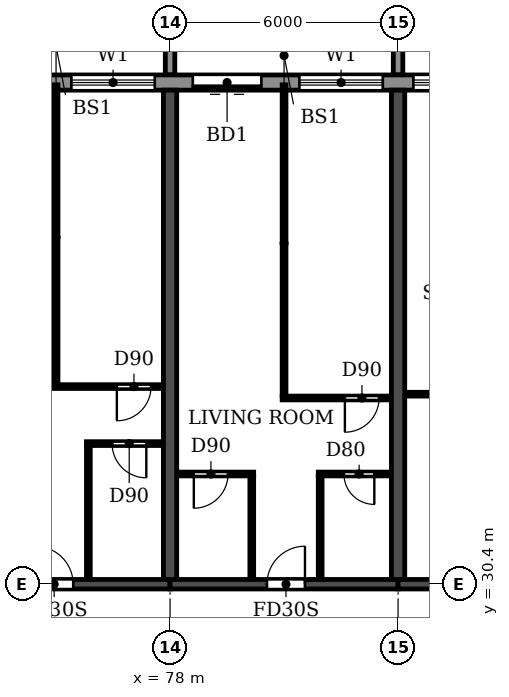
"""IFC4 building model, lengths in metres.
Left out: names, types, materials, properties, quantities, classifications, styles, units other than length and angle.
Written with IfcOpenShell. Run it as: python <this file> out.ifc"""

import sys

from ifc_helpers import new_model, si_unit, direction, frame, frame_2d, origin, place, context, subcontext, project, spatial, polyline, rectangle, outline, extrude, source, transform, mapped, element, fill, save


model = new_model("IFC4")
c1 = context("Model", 3, precision=1e-05, world=origin(), true_north=direction((0.0, 1.0)))
c2 = subcontext(c1, "Body", "Model", "MODEL_VIEW")
j1 = project(units=[si_unit("LENGTHUNIT", "METRE"), si_unit("PLANEANGLEUNIT", "RADIAN")], contexts=[c1])
p1 = place(None, origin())
s1 = spatial("IfcSite", under=j1, at=p1, CompositionType="ELEMENT")
p2 = place(p1, origin())
s2 = spatial("IfcBuilding", under=s1, at=p2, CompositionType="ELEMENT")
p3 = place(p2, frame((0.0, 0.0, 102.6)))
s3 = spatial("IfcBuildingStorey", under=s2, at=p3, CompositionType="ELEMENT", Elevation=102.6)
for number, where, z_axis, x_axis in (
    (1, (78.0, 30.525, 0.0), (0.0, 0.0, 1.0), (0.0, 1.0, 0.0)),
    (2, (84.0, 30.525, 0.0), (0.0, 0.0, 1.0), (0.0, 1.0, 0.0)),
):
    element("IfcWall", number, at=place(p3, frame(where, z_axis=z_axis, x_axis=x_axis)), inside=s3, PredefinedType="SHEAR", context=c2, shape_type="SweptSolid", body=[
        extrude(rectangle(XDim=12.875, YDim=0.35, at=frame_2d((6.438, 0.0))), origin(), (0.0, 0.0, 1.0), 3.0),
    ])
p4 = place(p3, frame((72.0, 30.4, 0.0), z_axis=(0.0, 0.0, 1.0), x_axis=(1.0, 0.0, 0.0)))
e3 = element("IfcWall", 3, at=p4, inside=s3, PredefinedType="SHEAR", context=c2, shape_type="SweptSolid", body=[
    extrude(rectangle(XDim=6.0, YDim=0.25, at=frame_2d((3.0, 0.0))), origin(), (0.0, 0.0, 1.0), 2.4),
])
p5 = place(p4, frame((2.45, 0.0, 0.0)))
e4 = element("IfcOpeningElement", 4, at=p5, cuts=e3, PredefinedType="OPENING", context=c2, shape_type="SweptSolid", body=[
    extrude(rectangle(XDim=1.0, YDim=2.1, at=frame_2d((0.5, 1.05))), frame((0.0, 0.135, 0.0), z_axis=(0.0, -1.0, 0.0), x_axis=(1.0, 0.0, 0.0)), (0.0, 0.0, 1.0), 0.27),
])
p6 = place(p3, frame((78.0, 30.4, 0.0), z_axis=(0.0, 0.0, 1.0), x_axis=(1.0, 0.0, 0.0)))
e5 = element("IfcWall", 5, at=p6, inside=s3, PredefinedType="SHEAR", context=c2, shape_type="SweptSolid", body=[
    extrude(rectangle(XDim=6.0, YDim=0.25, at=frame_2d((3.0, 0.0))), origin(), (0.0, 0.0, 1.0), 2.4),
])
p7 = place(p6, frame((2.55, 0.0, 0.0)))
e6 = element("IfcOpeningElement", 6, at=p7, cuts=e5, PredefinedType="OPENING", context=c2, shape_type="SweptSolid", body=[
    extrude(rectangle(XDim=1.0, YDim=2.1, at=frame_2d((0.5, 1.05))), frame((0.0, 0.135, 0.0), z_axis=(0.0, -1.0, 0.0), x_axis=(1.0, 0.0, 0.0)), (0.0, 0.0, 1.0), 0.27),
])
p8 = place(p3, frame((84.0, 30.4, 0.0), z_axis=(0.0, 0.0, 1.0), x_axis=(1.0, 0.0, 0.0)))
e7 = element("IfcWall", 7, at=p8, inside=s3, PredefinedType="SHEAR", context=c2, shape_type="SweptSolid", body=[
    extrude(rectangle(XDim=6.0, YDim=0.25, at=frame_2d((3.0, 0.0))), origin(), (0.0, 0.0, 1.0), 2.4),
])
p9 = place(p8, frame((2.55, 0.0, 0.0)))
e8 = element("IfcOpeningElement", 8, at=p9, cuts=e7, PredefinedType="OPENING", context=c2, shape_type="SweptSolid", body=[
    extrude(rectangle(XDim=1.0, YDim=2.1, at=frame_2d((0.5, 1.05))), frame((0.0, 0.135, 0.0), z_axis=(0.0, -1.0, 0.0), x_axis=(1.0, 0.0, 0.0)), (0.0, 0.0, 1.0), 0.27),
])
p10 = place(p3, frame((91.317, 43.6, 0.0), z_axis=(0.0, 0.0, 1.0), x_axis=(-1.0, 0.0, 0.0)))
e9 = element("IfcWall", 9, at=p10, inside=s3, PredefinedType="STANDARD", context=c2, shape_type="SweptSolid", body=[
    extrude(rectangle(XDim=80.634, YDim=0.4, at=frame_2d((40.317, 0.0))), origin(), (0.0, 0.0, 1.0), 3.0),
])
p11 = place(p10, frame((76.717, 0.0, 0.9)))
e10 = element("IfcOpeningElement", 10, at=p11, cuts=e9, PredefinedType="OPENING", context=c2, shape_type="SweptSolid", body=[
    extrude(rectangle(XDim=2.2, YDim=1.5, at=frame_2d((1.1, 0.75))), frame((0.0, 0.21, 0.0), z_axis=(0.0, -1.0, 0.0), x_axis=(1.0, 0.0, 0.0)), (0.0, 0.0, 1.0), 0.42),
])
p12 = place(p10, frame((73.917, 0.0, 0.0)))
e11 = element("IfcOpeningElement", 11, at=p12, cuts=e9, PredefinedType="OPENING", context=c2, shape_type="SweptSolid", body=[
    extrude(rectangle(XDim=1.8, YDim=2.4, at=frame_2d((0.9, 1.2))), frame((0.0, 0.21, 0.0), z_axis=(0.0, -1.0, 0.0), x_axis=(1.0, 0.0, 0.0)), (0.0, 0.0, 1.0), 0.42),
])
p13 = place(p10, frame((70.717, 0.0, 0.9)))
e12 = element("IfcOpeningElement", 12, at=p13, cuts=e9, PredefinedType="OPENING", context=c2, shape_type="SweptSolid", body=[
    extrude(rectangle(XDim=2.2, YDim=1.5, at=frame_2d((1.1, 0.75))), frame((0.0, 0.21, 0.0), z_axis=(0.0, -1.0, 0.0), x_axis=(1.0, 0.0, 0.0)), (0.0, 0.0, 1.0), 0.42),
])
p14 = place(p10, frame((67.717, 0.0, 0.9)))
e13 = element("IfcOpeningElement", 13, at=p14, cuts=e9, PredefinedType="OPENING", context=c2, shape_type="SweptSolid", body=[
    extrude(rectangle(XDim=2.2, YDim=1.5, at=frame_2d((1.1, 0.75))), frame((0.0, 0.21, 0.0), z_axis=(0.0, -1.0, 0.0), x_axis=(1.0, 0.0, 0.0)), (0.0, 0.0, 1.0), 0.42),
])
p15 = place(p10, frame((64.917, 0.0, 0.0)))
e14 = element("IfcOpeningElement", 14, at=p15, cuts=e9, PredefinedType="OPENING", context=c2, shape_type="SweptSolid", body=[
    extrude(rectangle(XDim=1.8, YDim=2.4, at=frame_2d((0.9, 1.2))), frame((0.0, 0.21, 0.0), z_axis=(0.0, -1.0, 0.0), x_axis=(1.0, 0.0, 0.0)), (0.0, 0.0, 1.0), 0.42),
])
p16 = place(p10, frame((61.717, 0.0, 0.9)))
e15 = element("IfcOpeningElement", 15, at=p16, cuts=e9, PredefinedType="OPENING", context=c2, shape_type="SweptSolid", body=[
    extrude(rectangle(XDim=2.2, YDim=1.5, at=frame_2d((1.1, 0.75))), frame((0.0, 0.21, 0.0), z_axis=(0.0, -1.0, 0.0), x_axis=(1.0, 0.0, 0.0)), (0.0, 0.0, 1.0), 0.42),
])
p17 = place(p10, frame((58.717, 0.0, 0.9)))
e16 = element("IfcOpeningElement", 16, at=p17, cuts=e9, PredefinedType="OPENING", context=c2, shape_type="SweptSolid", body=[
    extrude(rectangle(XDim=2.2, YDim=1.5, at=frame_2d((1.1, 0.75))), frame((0.0, 0.21, 0.0), z_axis=(0.0, -1.0, 0.0), x_axis=(1.0, 0.0, 0.0)), (0.0, 0.0, 1.0), 0.42),
])
p18 = place(p10, frame((55.717, 0.0, 0.9)))
e17 = element("IfcOpeningElement", 17, at=p18, cuts=e9, PredefinedType="OPENING", context=c2, shape_type="SweptSolid", body=[
    extrude(rectangle(XDim=2.2, YDim=1.5, at=frame_2d((1.1, 0.75))), frame((0.0, 0.21, 0.0), z_axis=(0.0, -1.0, 0.0), x_axis=(1.0, 0.0, 0.0)), (0.0, 0.0, 1.0), 0.42),
])
p19 = place(p10, frame((52.717, 0.0, 0.9)))
e18 = element("IfcOpeningElement", 18, at=p19, cuts=e9, PredefinedType="OPENING", context=c2, shape_type="SweptSolid", body=[
    extrude(rectangle(XDim=2.2, YDim=1.5, at=frame_2d((1.1, 0.75))), frame((0.0, 0.21, 0.0), z_axis=(0.0, -1.0, 0.0), x_axis=(1.0, 0.0, 0.0)), (0.0, 0.0, 1.0), 0.42),
])
p20 = place(p10, frame((49.917, 0.0, 0.0)))
e19 = element("IfcOpeningElement", 19, at=p20, cuts=e9, PredefinedType="OPENING", context=c2, shape_type="SweptSolid", body=[
    extrude(rectangle(XDim=1.8, YDim=2.4, at=frame_2d((0.9, 1.2))), frame((0.0, 0.21, 0.0), z_axis=(0.0, -1.0, 0.0), x_axis=(1.0, 0.0, 0.0)), (0.0, 0.0, 1.0), 0.42),
])
p21 = place(p10, frame((46.717, 0.0, 0.9)))
e20 = element("IfcOpeningElement", 20, at=p21, cuts=e9, PredefinedType="OPENING", context=c2, shape_type="SweptSolid", body=[
    extrude(rectangle(XDim=2.2, YDim=1.5, at=frame_2d((1.1, 0.75))), frame((0.0, 0.21, 0.0), z_axis=(0.0, -1.0, 0.0), x_axis=(1.0, 0.0, 0.0)), (0.0, 0.0, 1.0), 0.42),
])
p22 = place(p10, frame((43.917, 0.0, 0.0)))
e21 = element("IfcOpeningElement", 21, at=p22, cuts=e9, PredefinedType="OPENING", context=c2, shape_type="SweptSolid", body=[
    extrude(rectangle(XDim=1.8, YDim=2.4, at=frame_2d((0.9, 1.2))), frame((0.0, 0.21, 0.0), z_axis=(0.0, -1.0, 0.0), x_axis=(1.0, 0.0, 0.0)), (0.0, 0.0, 1.0), 0.42),
])
p23 = place(p10, frame((40.717, 0.0, 0.9)))
e22 = element("IfcOpeningElement", 22, at=p23, cuts=e9, PredefinedType="OPENING", context=c2, shape_type="SweptSolid", body=[
    extrude(rectangle(XDim=2.2, YDim=1.5, at=frame_2d((1.1, 0.75))), frame((0.0, 0.21, 0.0), z_axis=(0.0, -1.0, 0.0), x_axis=(1.0, 0.0, 0.0)), (0.0, 0.0, 1.0), 0.42),
])
p24 = place(p10, frame((37.717, 0.0, 0.9)))
e23 = element("IfcOpeningElement", 23, at=p24, cuts=e9, PredefinedType="OPENING", context=c2, shape_type="SweptSolid", body=[
    extrude(rectangle(XDim=2.2, YDim=1.5, at=frame_2d((1.1, 0.75))), frame((0.0, 0.21, 0.0), z_axis=(0.0, -1.0, 0.0), x_axis=(1.0, 0.0, 0.0)), (0.0, 0.0, 1.0), 0.42),
])
p25 = place(p10, frame((34.917, 0.0, 0.0)))
e24 = element("IfcOpeningElement", 24, at=p25, cuts=e9, PredefinedType="OPENING", context=c2, shape_type="SweptSolid", body=[
    extrude(rectangle(XDim=1.8, YDim=2.4, at=frame_2d((0.9, 1.2))), frame((0.0, 0.21, 0.0), z_axis=(0.0, -1.0, 0.0), x_axis=(1.0, 0.0, 0.0)), (0.0, 0.0, 1.0), 0.42),
])
p26 = place(p10, frame((31.717, 0.0, 0.9)))
e25 = element("IfcOpeningElement", 25, at=p26, cuts=e9, PredefinedType="OPENING", context=c2, shape_type="SweptSolid", body=[
    extrude(rectangle(XDim=2.2, YDim=1.5, at=frame_2d((1.1, 0.75))), frame((0.0, 0.21, 0.0), z_axis=(0.0, -1.0, 0.0), x_axis=(1.0, 0.0, 0.0)), (0.0, 0.0, 1.0), 0.42),
])
p27 = place(p10, frame((28.717, 0.0, 0.9)))
e26 = element("IfcOpeningElement", 26, at=p27, cuts=e9, PredefinedType="OPENING", context=c2, shape_type="SweptSolid", body=[
    extrude(rectangle(XDim=2.2, YDim=1.5, at=frame_2d((1.1, 0.75))), frame((0.0, 0.21, 0.0), z_axis=(0.0, -1.0, 0.0), x_axis=(1.0, 0.0, 0.0)), (0.0, 0.0, 1.0), 0.42),
])
p28 = place(p10, frame((25.917, 0.0, 0.0)))
e27 = element("IfcOpeningElement", 27, at=p28, cuts=e9, PredefinedType="OPENING", context=c2, shape_type="SweptSolid", body=[
    extrude(rectangle(XDim=1.8, YDim=2.4, at=frame_2d((0.9, 1.2))), frame((0.0, 0.21, 0.0), z_axis=(0.0, -1.0, 0.0), x_axis=(1.0, 0.0, 0.0)), (0.0, 0.0, 1.0), 0.42),
])
p29 = place(p10, frame((22.717, 0.0, 0.9)))
e28 = element("IfcOpeningElement", 28, at=p29, cuts=e9, PredefinedType="OPENING", context=c2, shape_type="SweptSolid", body=[
    extrude(rectangle(XDim=2.2, YDim=1.5, at=frame_2d((1.1, 0.75))), frame((0.0, 0.21, 0.0), z_axis=(0.0, -1.0, 0.0), x_axis=(1.0, 0.0, 0.0)), (0.0, 0.0, 1.0), 0.42),
])
p30 = place(p10, frame((19.717, 0.0, 0.9)))
e29 = element("IfcOpeningElement", 29, at=p30, cuts=e9, PredefinedType="OPENING", context=c2, shape_type="SweptSolid", body=[
    extrude(rectangle(XDim=2.2, YDim=1.5, at=frame_2d((1.1, 0.75))), frame((0.0, 0.21, 0.0), z_axis=(0.0, -1.0, 0.0), x_axis=(1.0, 0.0, 0.0)), (0.0, 0.0, 1.0), 0.42),
])
p31 = place(p10, frame((16.917, 0.0, 0.0)))
e30 = element("IfcOpeningElement", 30, at=p31, cuts=e9, PredefinedType="OPENING", context=c2, shape_type="SweptSolid", body=[
    extrude(rectangle(XDim=1.8, YDim=2.4, at=frame_2d((0.9, 1.2))), frame((0.0, 0.21, 0.0), z_axis=(0.0, -1.0, 0.0), x_axis=(1.0, 0.0, 0.0)), (0.0, 0.0, 1.0), 0.42),
])
p32 = place(p10, frame((13.717, 0.0, 0.9)))
e31 = element("IfcOpeningElement", 31, at=p32, cuts=e9, PredefinedType="OPENING", context=c2, shape_type="SweptSolid", body=[
    extrude(rectangle(XDim=2.2, YDim=1.5, at=frame_2d((1.1, 0.75))), frame((0.0, 0.21, 0.0), z_axis=(0.0, -1.0, 0.0), x_axis=(1.0, 0.0, 0.0)), (0.0, 0.0, 1.0), 0.42),
])
p33 = place(p10, frame((10.917, 0.0, 0.0)))
e32 = element("IfcOpeningElement", 32, at=p33, cuts=e9, PredefinedType="OPENING", context=c2, shape_type="SweptSolid", body=[
    extrude(rectangle(XDim=1.8, YDim=2.4, at=frame_2d((0.9, 1.2))), frame((0.0, 0.21, 0.0), z_axis=(0.0, -1.0, 0.0), x_axis=(1.0, 0.0, 0.0)), (0.0, 0.0, 1.0), 0.42),
])
p34 = place(p10, frame((7.717, 0.0, 0.9)))
e33 = element("IfcOpeningElement", 33, at=p34, cuts=e9, PredefinedType="OPENING", context=c2, shape_type="SweptSolid", body=[
    extrude(rectangle(XDim=2.2, YDim=1.5, at=frame_2d((1.1, 0.75))), frame((0.0, 0.21, 0.0), z_axis=(0.0, -1.0, 0.0), x_axis=(1.0, 0.0, 0.0)), (0.0, 0.0, 1.0), 0.42),
])
p35 = place(p10, frame((4.717, 0.0, 0.9)))
e34 = element("IfcOpeningElement", 34, at=p35, cuts=e9, PredefinedType="OPENING", context=c2, shape_type="SweptSolid", body=[
    extrude(rectangle(XDim=2.2, YDim=1.5, at=frame_2d((1.1, 0.75))), frame((0.0, 0.21, 0.0), z_axis=(0.0, -1.0, 0.0), x_axis=(1.0, 0.0, 0.0)), (0.0, 0.0, 1.0), 0.42),
])
p36 = place(p10, frame((1.917, 0.0, 0.0)))
e35 = element("IfcOpeningElement", 35, at=p36, cuts=e9, PredefinedType="OPENING", context=c2, shape_type="SweptSolid", body=[
    extrude(rectangle(XDim=1.8, YDim=2.4, at=frame_2d((0.9, 1.2))), frame((0.0, 0.21, 0.0), z_axis=(0.0, -1.0, 0.0), x_axis=(1.0, 0.0, 0.0)), (0.0, 0.0, 1.0), 0.42),
])
m1 = source(origin(), c2, "Body", "SweptSolid", [
    extrude(outline(polyline([(0.0, 0.0), (0.25, 0.0), (0.25, 3.1), (0.0, 3.1), (0.0, 0.0)])), origin(), (0.0, 0.0, 1.0), 3.1),
])
for number, where in (
    (36, (77.875, 43.8, 0.0)),
    (37, (83.875, 43.8, 0.0)),
):
    element("IfcWall", number, at=place(p3, frame(where)), inside=s3, PredefinedType="STANDARD", context=c2, shape_type="MappedRepresentation", body=[
        mapped(m1, transform((0.0, 0.0, 0.0))),
    ])
p37 = place(p3, frame((78.185, 33.3, 0.0), z_axis=(0.0, 0.0, 1.0), x_axis=(1.0, 0.0, 0.0)))
e38 = element("IfcWall", 38, at=p37, inside=s3, PredefinedType="PARTITIONING", context=c2, shape_type="SweptSolid", body=[
    extrude(rectangle(XDim=2.015, YDim=0.1, at=frame_2d((1.007, 0.0))), origin(), (0.0, 0.0, 1.0), 3.0),
])
p38 = place(p37, frame((0.44, 0.0, 0.0)))
e39 = element("IfcOpeningElement", 39, at=p38, cuts=e38, PredefinedType="OPENING", context=c2, shape_type="SweptSolid", body=[
    extrude(rectangle(XDim=0.9, YDim=2.1, at=frame_2d((0.45, 1.05))), frame((0.0, 0.06, 0.0), z_axis=(0.0, -1.0, 0.0), x_axis=(1.0, 0.0, 0.0)), (0.0, 0.0, 1.0), 0.12),
])
p39 = place(p3, frame((81.9, 33.3, 0.0), z_axis=(0.0, 0.0, 1.0), x_axis=(1.0, 0.0, 0.0)))
e40 = element("IfcWall", 40, at=p39, inside=s3, PredefinedType="PARTITIONING", context=c2, shape_type="SweptSolid", body=[
    extrude(rectangle(XDim=1.915, YDim=0.1, at=frame_2d((0.958, 0.0))), origin(), (0.0, 0.0, 1.0), 3.0),
])
p40 = place(p39, frame((0.675, 0.0, 0.0)))
e41 = element("IfcOpeningElement", 41, at=p40, cuts=e40, PredefinedType="OPENING", context=c2, shape_type="SweptSolid", body=[
    extrude(rectangle(XDim=0.8, YDim=2.1, at=frame_2d((0.4, 1.05))), frame((0.0, 0.06, 0.0), z_axis=(0.0, -1.0, 0.0), x_axis=(1.0, 0.0, 0.0)), (0.0, 0.0, 1.0), 0.12),
])
p41 = place(p3, frame((75.8, 34.1, 0.0), z_axis=(0.0, 0.0, 1.0), x_axis=(1.0, 0.0, 0.0)))
e42 = element("IfcWall", 42, at=p41, inside=s3, PredefinedType="PARTITIONING", context=c2, shape_type="SweptSolid", body=[
    extrude(rectangle(XDim=2.015, YDim=0.1, at=frame_2d((1.007, 0.0))), origin(), (0.0, 0.0, 1.0), 3.0),
])
p42 = place(p41, frame((0.675, 0.0, 0.0)))
e43 = element("IfcOpeningElement", 43, at=p42, cuts=e42, PredefinedType="OPENING", context=c2, shape_type="SweptSolid", body=[
    extrude(rectangle(XDim=0.9, YDim=2.1, at=frame_2d((0.45, 1.05))), frame((0.0, 0.06, 0.0), z_axis=(0.0, -1.0, 0.0), x_axis=(1.0, 0.0, 0.0)), (0.0, 0.0, 1.0), 0.12),
])
p43 = place(p3, frame((80.95, 35.3, 0.0), z_axis=(0.0, 0.0, 1.0), x_axis=(1.0, 0.0, 0.0)))
e44 = element("IfcWall", 44, at=p43, inside=s3, PredefinedType="PARTITIONING", context=c2, shape_type="SweptSolid", body=[
    extrude(rectangle(XDim=2.865, YDim=0.1, at=frame_2d((1.433, 0.0))), origin(), (0.0, 0.0, 1.0), 3.0),
])
p44 = place(p43, frame((1.65, 0.0, 0.0)))
e45 = element("IfcOpeningElement", 45, at=p44, cuts=e44, PredefinedType="OPENING", context=c2, shape_type="SweptSolid", body=[
    extrude(rectangle(XDim=0.9, YDim=2.1, at=frame_2d((0.45, 1.05))), frame((0.0, 0.06, 0.0), z_axis=(0.0, -1.0, 0.0), x_axis=(1.0, 0.0, 0.0)), (0.0, 0.0, 1.0), 0.12),
])
p45 = place(p3, frame((84.185, 35.4, 0.0), z_axis=(0.0, 0.0, 1.0), x_axis=(1.0, 0.0, 0.0)))
e46 = element("IfcWall", 46, at=p45, inside=s3, PredefinedType="PARTITIONING", context=c2, shape_type="SweptSolid", body=[
    extrude(rectangle(XDim=2.015, YDim=0.1, at=frame_2d((1.007, 0.0))), origin(), (0.0, 0.0, 1.0), 3.0),
])
p46 = place(p3, frame((74.95, 35.6, 0.0), z_axis=(0.0, 0.0, 1.0), x_axis=(1.0, 0.0, 0.0)))
e47 = element("IfcWall", 47, at=p46, inside=s3, PredefinedType="PARTITIONING", context=c2, shape_type="SweptSolid", body=[
    extrude(rectangle(XDim=2.865, YDim=0.1, at=frame_2d((1.433, 0.0))), origin(), (0.0, 0.0, 1.0), 3.0),
])
p47 = place(p46, frame((1.65, 0.0, 0.0)))
e48 = element("IfcOpeningElement", 48, at=p47, cuts=e47, PredefinedType="OPENING", context=c2, shape_type="SweptSolid", body=[
    extrude(rectangle(XDim=0.9, YDim=2.1, at=frame_2d((0.45, 1.05))), frame((0.0, 0.06, 0.0), z_axis=(0.0, -1.0, 0.0), x_axis=(1.0, 0.0, 0.0)), (0.0, 0.0, 1.0), 0.12),
])
p48 = place(p3, frame((75.0, 35.65, 0.0), z_axis=(0.0, 0.0, 1.0), x_axis=(0.0, 1.0, 0.0)))
e49 = element("IfcWall", 49, at=p48, inside=s3, PredefinedType="PARTITIONING", context=c2, shape_type="SweptSolid", body=[
    extrude(rectangle(XDim=7.89, YDim=0.1, at=frame_2d((3.945, 0.0))), origin(), (0.0, 0.0, 1.0), 3.0),
])
p49 = place(p3, frame((75.85, 30.535, 0.0), z_axis=(0.0, 0.0, 1.0), x_axis=(0.0, 1.0, 0.0)))
e50 = element("IfcWall", 50, at=p49, inside=s3, PredefinedType="PARTITIONING", context=c2, shape_type="SweptSolid", body=[
    extrude(rectangle(XDim=3.515, YDim=0.1, at=frame_2d((1.758, 0.0))), origin(), (0.0, 0.0, 1.0), 3.0),
])
p50 = place(p3, frame((80.15, 30.535, 0.0), z_axis=(0.0, 0.0, 1.0), x_axis=(0.0, 1.0, 0.0)))
e51 = element("IfcWall", 51, at=p50, inside=s3, PredefinedType="PARTITIONING", context=c2, shape_type="SweptSolid", body=[
    extrude(rectangle(XDim=2.715, YDim=0.1, at=frame_2d((1.357, 0.0))), origin(), (0.0, 0.0, 1.0), 3.0),
])
p51 = place(p3, frame((81.0, 35.35, 0.0), z_axis=(0.0, 0.0, 1.0), x_axis=(0.0, 1.0, 0.0)))
e52 = element("IfcWall", 52, at=p51, inside=s3, PredefinedType="PARTITIONING", context=c2, shape_type="SweptSolid", body=[
    extrude(rectangle(XDim=8.19, YDim=0.1, at=frame_2d((4.095, 0.0))), origin(), (0.0, 0.0, 1.0), 3.0),
])
p52 = place(p3, frame((81.95, 30.535, 0.0), z_axis=(0.0, 0.0, 1.0), x_axis=(0.0, 1.0, 0.0)))
e53 = element("IfcWall", 53, at=p52, inside=s3, PredefinedType="PARTITIONING", context=c2, shape_type="SweptSolid", body=[
    extrude(rectangle(XDim=2.715, YDim=0.1, at=frame_2d((1.357, 0.0))), origin(), (0.0, 0.0, 1.0), 3.0),
])
p53 = place(p32, origin())
e54 = element("IfcWindow", 54, at=p53, inside=s3, PartitioningType="DOUBLE_PANEL_HORIZONTAL", PredefinedType="WINDOW", context=c2, shape_type="SweptSolid", body=[
    extrude(rectangle(XDim=2.2, YDim=1.5, at=frame_2d((1.1, 0.75))), frame((0.0, 0.03, 0.0), z_axis=(0.0, -1.0, 0.0), x_axis=(1.0, 0.0, 0.0)), (0.0, 0.0, 1.0), 0.06),
])
fill(e31, e54)
p54 = place(p33, origin())
e55 = element("IfcDoor", 55, at=p54, inside=s3, OperationType="DOUBLE_DOOR_SLIDING", PredefinedType="DOOR", context=c2, shape_type="SweptSolid", body=[
    extrude(rectangle(XDim=1.8, YDim=2.4, at=frame_2d((0.9, 1.2))), frame((0.0, 0.025, 0.0), z_axis=(0.0, -1.0, 0.0), x_axis=(1.0, 0.0, 0.0)), (0.0, 0.0, 1.0), 0.05),
])
fill(e32, e55)
p55 = place(p34, origin())
e56 = element("IfcWindow", 56, at=p55, inside=s3, PartitioningType="DOUBLE_PANEL_HORIZONTAL", PredefinedType="WINDOW", context=c2, shape_type="SweptSolid", body=[
    extrude(rectangle(XDim=2.2, YDim=1.5, at=frame_2d((1.1, 0.75))), frame((0.0, 0.03, 0.0), z_axis=(0.0, -1.0, 0.0), x_axis=(1.0, 0.0, 0.0)), (0.0, 0.0, 1.0), 0.06),
])
fill(e33, e56)
p56 = place(p35, origin())
e57 = element("IfcWindow", 57, at=p56, inside=s3, PartitioningType="DOUBLE_PANEL_HORIZONTAL", PredefinedType="WINDOW", context=c2, shape_type="SweptSolid", body=[
    extrude(rectangle(XDim=2.2, YDim=1.5, at=frame_2d((1.1, 0.75))), frame((0.0, 0.03, 0.0), z_axis=(0.0, -1.0, 0.0), x_axis=(1.0, 0.0, 0.0)), (0.0, 0.0, 1.0), 0.06),
])
fill(e34, e57)
p57 = place(p5, origin())
e58 = element("IfcDoor", 58, at=p57, inside=s3, OperationType="SINGLE_SWING_LEFT", PredefinedType="DOOR", context=c2, shape_type="SweptSolid", body=[
    extrude(rectangle(XDim=1.0, YDim=2.1, at=frame_2d((0.5, 1.05))), frame((0.0, 0.025, 0.0), z_axis=(0.0, -1.0, 0.0), x_axis=(1.0, 0.0, 0.0)), (0.0, 0.0, 1.0), 0.05),
])
fill(e4, e58)
p58 = place(p42, frame((0.9, 0.0, 0.0), z_axis=(0.0, 0.0, 1.0), x_axis=(-1.0, 0.0, 0.0)))
e59 = element("IfcDoor", 59, at=p58, inside=s3, OperationType="SINGLE_SWING_LEFT", PredefinedType="DOOR", context=c2, shape_type="SweptSolid", body=[
    extrude(rectangle(XDim=0.9, YDim=2.1, at=frame_2d((0.45, 1.05))), frame((0.0, 0.025, 0.0), z_axis=(0.0, -1.0, 0.0), x_axis=(1.0, 0.0, 0.0)), (0.0, 0.0, 1.0), 0.05),
])
fill(e43, e59)
p59 = place(p47, frame((0.9, 0.0, 0.0), z_axis=(0.0, 0.0, 1.0), x_axis=(-1.0, 0.0, 0.0)))
e60 = element("IfcDoor", 60, at=p59, inside=s3, OperationType="SINGLE_SWING_RIGHT", PredefinedType="DOOR", context=c2, shape_type="SweptSolid", body=[
    extrude(rectangle(XDim=0.9, YDim=2.1, at=frame_2d((0.45, 1.05))), frame((0.0, 0.025, 0.0), z_axis=(0.0, -1.0, 0.0), x_axis=(1.0, 0.0, 0.0)), (0.0, 0.0, 1.0), 0.05),
])
fill(e48, e60)
p60 = place(p38, frame((0.9, 0.0, 0.0), z_axis=(0.0, 0.0, 1.0), x_axis=(-1.0, 0.0, 0.0)))
e61 = element("IfcDoor", 61, at=p60, inside=s3, OperationType="SINGLE_SWING_RIGHT", PredefinedType="DOOR", context=c2, shape_type="SweptSolid", body=[
    extrude(rectangle(XDim=0.9, YDim=2.1, at=frame_2d((0.45, 1.05))), frame((0.0, 0.025, 0.0), z_axis=(0.0, -1.0, 0.0), x_axis=(1.0, 0.0, 0.0)), (0.0, 0.0, 1.0), 0.05),
])
fill(e39, e61)
p61 = place(p7, origin())
e62 = element("IfcDoor", 62, at=p61, inside=s3, OperationType="SINGLE_SWING_RIGHT", PredefinedType="DOOR", context=c2, shape_type="SweptSolid", body=[
    extrude(rectangle(XDim=1.0, YDim=2.1, at=frame_2d((0.5, 1.05))), frame((0.0, 0.025, 0.0), z_axis=(0.0, -1.0, 0.0), x_axis=(1.0, 0.0, 0.0)), (0.0, 0.0, 1.0), 0.05),
])
fill(e6, e62)
p62 = place(p40, frame((0.8, 0.0, 0.0), z_axis=(0.0, 0.0, 1.0), x_axis=(-1.0, 0.0, 0.0)))
e63 = element("IfcDoor", 63, at=p62, inside=s3, OperationType="SINGLE_SWING_LEFT", PredefinedType="DOOR", context=c2, shape_type="SweptSolid", body=[
    extrude(rectangle(XDim=0.8, YDim=2.1, at=frame_2d((0.4, 1.05))), frame((0.0, 0.025, 0.0), z_axis=(0.0, -1.0, 0.0), x_axis=(1.0, 0.0, 0.0)), (0.0, 0.0, 1.0), 0.05),
])
fill(e41, e63)
p63 = place(p44, frame((0.9, 0.0, 0.0), z_axis=(0.0, 0.0, 1.0), x_axis=(-1.0, 0.0, 0.0)))
e64 = element("IfcDoor", 64, at=p63, inside=s3, OperationType="SINGLE_SWING_RIGHT", PredefinedType="DOOR", context=c2, shape_type="SweptSolid", body=[
    extrude(rectangle(XDim=0.9, YDim=2.1, at=frame_2d((0.45, 1.05))), frame((0.0, 0.025, 0.0), z_axis=(0.0, -1.0, 0.0), x_axis=(1.0, 0.0, 0.0)), (0.0, 0.0, 1.0), 0.05),
])
fill(e45, e64)
save(model, sys.argv[1])
